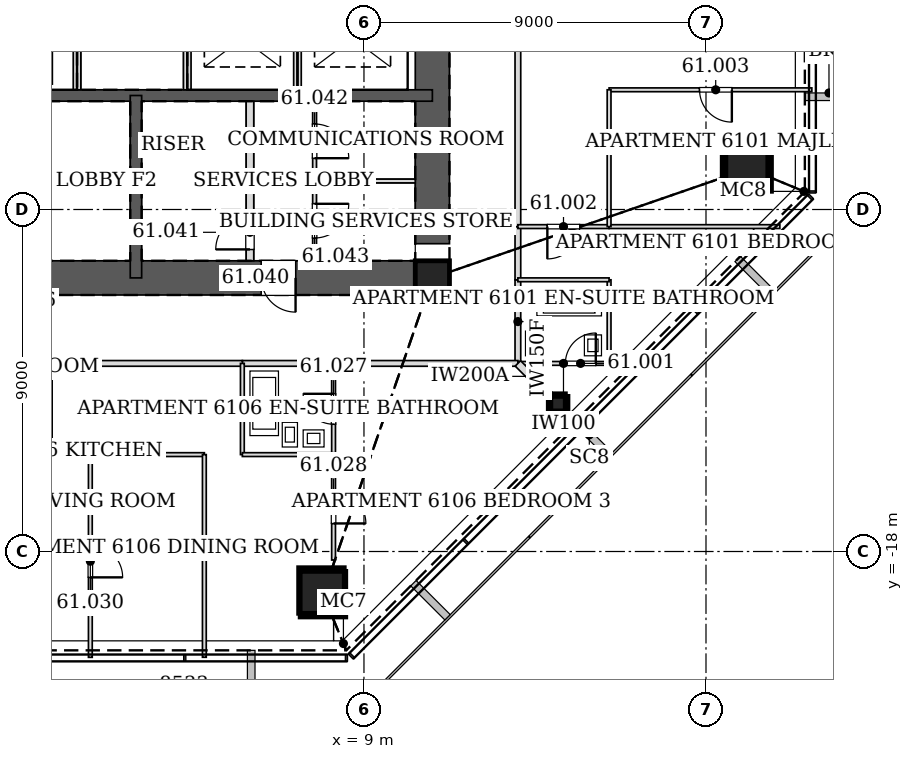
"""IFC4 building model, lengths in metres.
Left out: names, types, materials, properties, quantities, classifications, styles, units other than length and angle.
Written with IfcOpenShell. Run it as: python <this file> out.ifc"""

import sys

from ifc_helpers import new_model, si_unit, direction, frame, frame_2d, origin, origin_2d, place, context, subcontext, project, spatial, rectangle, hollow_rectangle, extrude, element, fill, save


model = new_model("IFC4")
c1 = context("Model", 3, precision=1e-05, world=origin(), true_north=direction((0.0, 1.0)))
c2 = subcontext(c1, "Body", "Model", "MODEL_VIEW")
j1 = project(units=[si_unit("LENGTHUNIT", "METRE"), si_unit("PLANEANGLEUNIT", "RADIAN")], contexts=[c1])
p1 = place(None, origin())
s1 = spatial("IfcSite", under=j1, at=p1, CompositionType="ELEMENT")
p2 = place(p1, origin())
s2 = spatial("IfcBuilding", under=s1, at=p2, CompositionType="ELEMENT")
p3 = place(p2, frame((0.0, 0.0, 255.0)))
s3 = spatial("IfcBuildingStorey", under=s2, at=p3, CompositionType="ELEMENT", Elevation=255.0)
for number, where, z_axis, x_axis in (
    (1, (7.921, -19.123, 0.0), (-0.012, 0.028, 1.0), (-0.924, -0.383, 0.0)),
    (2, (19.123, -7.921, 0.0), (-0.028, 0.012, 1.0), (-0.383, -0.924, 0.0)),
):
    element("IfcColumn", number, at=place(p3, frame(where, z_axis=z_axis, x_axis=x_axis)), inside=s3, PredefinedType="COLUMN", context=c2, shape_type="SweptSolid", body=[
        extrude(hollow_rectangle(XDim=1.2, YDim=1.2, WallThickness=0.055, at=origin_2d()), origin(), (0.0, 0.0, 1.0), 3.401),
    ])
p4 = place(p3, frame((14.143, -14.143, 0.0), z_axis=(-0.01995470925, 0.01995470925, 0.999601730269), x_axis=(-0.707106781187, -0.707106781187, 0.0)))
e3 = element("IfcColumn", 3, at=p4, inside=s3, PredefinedType="COLUMN", context=c2, shape_type="SweptSolid", body=[
    extrude(hollow_rectangle(XDim=0.45, YDim=0.45, WallThickness=0.02, at=origin_2d()), origin(), (0.0, 0.0, 1.0), 3.401),
])
p5 = place(p3, frame((10.8, -10.8, 0.0), z_axis=(0.0, 0.0, 1.0), x_axis=(1.0, 0.0, 0.0)))
e4 = element("IfcColumn", 4, at=p5, inside=s3, PredefinedType="COLUMN", context=c2, shape_type="SweptSolid", body=[
    extrude(hollow_rectangle(XDim=0.9, YDim=0.9, WallThickness=0.04, at=origin_2d()), origin(), (0.0, 0.0, 1.0), 3.4),
])
p6 = place(p3, frame((-10.8, -10.8, 0.0), z_axis=(0.0, 0.0, 1.0), x_axis=(1.0, 0.0, 0.0)))
e5 = element("IfcWall", 5, at=p6, inside=s3, PredefinedType="SOLIDWALL", context=c2, shape_type="SweptSolid", body=[
    extrude(rectangle(XDim=21.6, YDim=0.9, at=frame_2d((10.8, 0.0))), origin(), (0.0, 0.0, 1.0), 3.4),
])
p7 = place(p6, frame((10.05, 0.0, 0.0)))
e6 = element("IfcOpeningElement", 6, at=p7, cuts=e5, PredefinedType="OPENING", context=c2, shape_type="SweptSolid", body=[
    extrude(rectangle(XDim=1.5, YDim=2.1, at=frame_2d((0.75, 1.05))), frame((0.0, 0.46, 0.0), z_axis=(0.0, -1.0, 0.0), x_axis=(1.0, 0.0, 0.0)), (0.0, 0.0, 1.0), 0.92),
])
p8 = place(p6, frame((17.1, 0.0, 0.0)))
e7 = element("IfcOpeningElement", 7, at=p8, cuts=e5, PredefinedType="OPENING", context=c2, shape_type="SweptSolid", body=[
    extrude(rectangle(XDim=0.9, YDim=2.1, at=frame_2d((0.45, 1.05))), frame((0.0, 0.46, 0.0), z_axis=(0.0, -1.0, 0.0), x_axis=(1.0, 0.0, 0.0)), (0.0, 0.0, 1.0), 0.92),
])
p9 = place(p3, frame((10.8, -10.8, 0.0), z_axis=(0.0, 0.0, 1.0), x_axis=(0.0, 1.0, 0.0)))
e8 = element("IfcWall", 8, at=p9, inside=s3, PredefinedType="SOLIDWALL", context=c2, shape_type="SweptSolid", body=[
    extrude(rectangle(XDim=21.6, YDim=0.9, at=frame_2d((10.8, 0.0))), origin(), (0.0, 0.0, 1.0), 3.4),
])
p10 = place(p9, frame((11.7, 0.0, 0.0)))
e9 = element("IfcOpeningElement", 9, at=p10, cuts=e8, PredefinedType="OPENING", context=c2, shape_type="SweptSolid", body=[
    extrude(rectangle(XDim=1.2, YDim=2.1, at=frame_2d((0.6, 1.05))), frame((0.0, 0.46, 0.0), z_axis=(0.0, -1.0, 0.0), x_axis=(1.0, 0.0, 0.0)), (0.0, 0.0, 1.0), 0.92),
])
p11 = place(p9, frame((8.7, 0.0, 0.0)))
e10 = element("IfcOpeningElement", 10, at=p11, cuts=e8, PredefinedType="OPENING", context=c2, shape_type="SweptSolid", body=[
    extrude(rectangle(XDim=1.2, YDim=2.1, at=frame_2d((0.6, 1.05))), frame((0.0, 0.46, 0.0), z_axis=(0.0, -1.0, 0.0), x_axis=(1.0, 0.0, 0.0)), (0.0, 0.0, 1.0), 0.92),
])
p12 = place(p3, frame((-10.8, -6.0, 0.0), z_axis=(0.0, 0.0, 1.0), x_axis=(1.0, 0.0, 0.0)))
e11 = element("IfcWall", 11, at=p12, inside=s3, PredefinedType="SOLIDWALL", context=c2, shape_type="SweptSolid", body=[
    extrude(rectangle(XDim=21.6, YDim=0.3, at=frame_2d((10.8, 0.0))), origin(), (0.0, 0.0, 1.0), 3.4),
])
p13 = place(p12, frame((10.25, 0.0, 0.0)))
e12 = element("IfcOpeningElement", 12, at=p13, cuts=e11, PredefinedType="OPENING", context=c2, shape_type="SweptSolid", body=[
    extrude(rectangle(XDim=1.1, YDim=2.1, at=frame_2d((0.55, 1.05))), frame((0.0, 0.16, 0.0), z_axis=(0.0, -1.0, 0.0), x_axis=(1.0, 0.0, 0.0)), (0.0, 0.0, 1.0), 0.32),
])
p14 = place(p3, frame((3.0, -6.0, 0.0), z_axis=(0.0, 0.0, 1.0), x_axis=(0.0, -1.0, 0.0)))
e13 = element("IfcWall", 13, at=p14, inside=s3, PredefinedType="SOLIDWALL", context=c2, shape_type="SweptSolid", body=[
    extrude(rectangle(XDim=4.8, YDim=0.3, at=frame_2d((2.4, 0.0))), origin(), (0.0, 0.0, 1.0), 3.4),
])
p15 = place(p3, frame((13.05, -13.05, 0.0), z_axis=(0.0, 0.0, 1.0), x_axis=(0.0, 1.0, 0.0)))
e14 = element("IfcWall", 14, at=p15, inside=s3, PredefinedType="PARTITIONING", context=c2, shape_type="SweptSolid", body=[
    extrude(rectangle(XDim=2.201, YDim=0.15, at=frame_2d((1.101, 0.0))), origin(), (0.0, 0.0, 1.0), 2.656),
])
p16 = place(p3, frame((13.05, -10.851, 0.0), z_axis=(0.0, 0.0, 1.0), x_axis=(0.0, 1.0, 0.0)))
e15 = element("IfcWall", 15, at=p16, inside=s3, PredefinedType="PARTITIONING", context=c2, shape_type="SweptSolid", body=[
    extrude(rectangle(XDim=1.402, YDim=0.15, at=frame_2d((0.701, 0.0))), origin(), (0.0, 0.0, 1.0), 2.349),
])
p17 = place(p3, frame((13.05, -9.451, 0.0), z_axis=(0.0, 0.0, 1.0), x_axis=(0.0, 1.0, 0.0)))
e16 = element("IfcWall", 16, at=p17, inside=s3, PredefinedType="PARTITIONING", context=c2, shape_type="SweptSolid", body=[
    extrude(rectangle(XDim=5.402, YDim=0.15, at=frame_2d((2.701, 0.0))), origin(), (0.0, 0.0, 1.0), 2.662),
])
p18 = place(p3, frame((0.182, -13.05, 0.0), z_axis=(0.0, 0.0, 1.0), x_axis=(1.0, 0.0, 0.0)))
e17 = element("IfcWall", 17, at=p18, inside=s3, PredefinedType="PARTITIONING", context=c2, shape_type="SweptSolid", body=[
    extrude(rectangle(XDim=0.619, YDim=0.15, at=frame_2d((0.309, 0.0))), origin(), (0.0, 0.0, 1.0), 2.662),
])
p19 = place(p3, frame((5.799, -13.05, 0.0), z_axis=(0.0, 0.0, 1.0), x_axis=(1.0, 0.0, 0.0)))
e18 = element("IfcWall", 18, at=p19, inside=s3, PredefinedType="PARTITIONING", context=c2, shape_type="SweptSolid", body=[
    extrude(rectangle(XDim=2.402, YDim=0.15, at=frame_2d((1.201, 0.0))), origin(), (0.0, 0.0, 1.0), 2.662),
])
p20 = place(p3, frame((8.199, -13.05, 0.0), z_axis=(0.0, 0.0, 1.0), x_axis=(1.0, 0.0, 0.0)))
e19 = element("IfcWall", 19, at=p20, inside=s3, PredefinedType="PARTITIONING", context=c2, shape_type="SweptSolid", body=[
    extrude(rectangle(XDim=4.851, YDim=0.15, at=frame_2d((2.426, 0.0))), origin(), (0.0, 0.0, 1.0), 2.349),
])
p21 = place(p3, frame((0.799, -13.05, 0.0), z_axis=(0.0, 0.0, 1.0), x_axis=(1.0, 0.0, 0.0)))
e20 = element("IfcWall", 20, at=p21, inside=s3, PredefinedType="PARTITIONING", context=c2, shape_type="SweptSolid", body=[
    extrude(rectangle(XDim=5.002, YDim=0.15, at=frame_2d((2.501, 0.0))), origin(), (0.0, 0.0, 1.0), 2.662),
])
p22 = place(p3, frame((13.05, -13.05, 0.0), z_axis=(0.0, 0.0, 1.0), x_axis=(1.0, 0.0, 0.0)))
e21 = element("IfcWall", 21, at=p22, inside=s3, PredefinedType="PARTITIONING", context=c2, shape_type="SweptSolid", body=[
    extrude(rectangle(XDim=2.4, YDim=0.1, at=frame_2d((1.2, 0.0))), origin(), (0.0, 0.0, 1.0), 2.656),
])
p23 = place(p22, frame((1.25, 0.0, 0.0)))
e22 = element("IfcOpeningElement", 22, at=p23, cuts=e21, PredefinedType="OPENING", context=c2, shape_type="SweptSolid", body=[
    extrude(rectangle(XDim=0.8, YDim=2.1, at=frame_2d((0.4, 1.05))), frame((0.0, 0.06, 0.0), z_axis=(0.0, -1.0, 0.0), x_axis=(1.0, 0.0, 0.0)), (0.0, 0.0, 1.0), 0.12),
])
p24 = place(p3, frame((15.45, -13.05, 0.0), z_axis=(0.0, 0.0, 1.0), x_axis=(0.0, 1.0, 0.0)))
e23 = element("IfcWall", 23, at=p24, inside=s3, PredefinedType="PARTITIONING", context=c2, shape_type="SweptSolid", body=[
    extrude(rectangle(XDim=2.2, YDim=0.1, at=frame_2d((1.1, 0.0))), origin(), (0.0, 0.0, 1.0), 2.74),
])
p25 = place(p3, frame((15.45, -10.85, 0.0), z_axis=(0.0, 0.0, 1.0), x_axis=(-1.0, 0.0, 0.0)))
e24 = element("IfcWall", 24, at=p25, inside=s3, PredefinedType="PARTITIONING", context=c2, shape_type="SweptSolid", body=[
    extrude(rectangle(XDim=2.4, YDim=0.1, at=frame_2d((1.2, 0.0))), origin(), (0.0, 0.0, 1.0), 2.786),
])
p26 = place(p3, frame((19.943, -9.45, 0.0), z_axis=(0.0, 0.0, 1.0), x_axis=(-1.0, 0.0, 0.0)))
e25 = element("IfcWall", 25, at=p26, inside=s3, PredefinedType="PARTITIONING", context=c2, shape_type="SweptSolid", body=[
    extrude(rectangle(XDim=4.494, YDim=0.1, at=frame_2d((2.247, 0.0))), origin(), (0.0, 0.0, 1.0), 2.74),
])
p27 = place(p3, frame((15.451, -9.45, 0.0), z_axis=(0.0, 0.0, 1.0), x_axis=(-1.0, 0.0, 0.0)))
e26 = element("IfcWall", 26, at=p27, inside=s3, PredefinedType="PARTITIONING", context=c2, shape_type="SweptSolid", body=[
    extrude(rectangle(XDim=2.401, YDim=0.1, at=frame_2d((1.2, 0.0))), origin(), (0.0, 0.0, 1.0), 2.349),
])
p28 = place(p27, frame((0.775, 0.0, 0.0)))
e27 = element("IfcOpeningElement", 27, at=p28, cuts=e26, PredefinedType="OPENING", context=c2, shape_type="SweptSolid", body=[
    extrude(rectangle(XDim=0.85, YDim=2.1, at=frame_2d((0.425, 1.05))), frame((0.0, 0.06, 0.0), z_axis=(0.0, -1.0, 0.0), x_axis=(1.0, 0.0, 0.0)), (0.0, 0.0, 1.0), 0.12),
])
p29 = place(p3, frame((13.05, -13.05, 0.0), z_axis=(0.0, 0.0, 1.0), x_axis=(0.707106781187, -0.707106781187, 0.0)))
e28 = element("IfcWall", 28, at=p29, inside=s3, PredefinedType="PARTITIONING", context=c2, shape_type="SweptSolid", body=[
    extrude(rectangle(XDim=1.205, YDim=0.2, at=frame_2d((0.603, 0.0))), origin(), (0.0, 0.0, 1.0), 2.656),
])
p30 = place(p3, frame((20.785, -5.85, 0.0), z_axis=(0.0, 0.0, 1.0), x_axis=(-1.0, 0.0, 0.0)))
e29 = element("IfcWall", 29, at=p30, inside=s3, PredefinedType="PARTITIONING", context=c2, shape_type="SweptSolid", body=[
    extrude(rectangle(XDim=5.335, YDim=0.1, at=frame_2d((2.667, 0.0))), origin(), (0.0, 0.0, 1.0), 2.662),
])
p31 = place(p30, frame((2.104, 0.0, 0.0)))
e30 = element("IfcOpeningElement", 30, at=p31, cuts=e29, PredefinedType="OPENING", context=c2, shape_type="SweptSolid", body=[
    extrude(rectangle(XDim=0.85, YDim=2.1, at=frame_2d((0.425, 1.05))), frame((0.0, 0.06, 0.0), z_axis=(0.0, -1.0, 0.0), x_axis=(1.0, 0.0, 0.0)), (0.0, 0.0, 1.0), 0.12),
])
p32 = place(p3, frame((15.45, -5.85, 0.0), z_axis=(0.0, 0.0, 1.0), x_axis=(0.0, -1.0, 0.0)))
e31 = element("IfcWall", 31, at=p32, inside=s3, PredefinedType="PARTITIONING", context=c2, shape_type="SweptSolid", body=[
    extrude(rectangle(XDim=3.6, YDim=0.1, at=frame_2d((1.8, 0.0))), origin(), (0.0, 0.0, 1.0), 2.349),
])
p33 = place(p3, frame((8.2, -15.45, 0.0), z_axis=(0.0, 0.0, 1.0), x_axis=(0.0, 1.0, 0.0)))
e32 = element("IfcWall", 32, at=p33, inside=s3, PredefinedType="PARTITIONING", context=c2, shape_type="SweptSolid", body=[
    extrude(rectangle(XDim=2.4, YDim=0.1, at=frame_2d((1.2, 0.0))), origin(), (0.0, 0.0, 1.0), 2.662),
])
p34 = place(p33, frame((0.8, 0.0, 0.0)))
e33 = element("IfcOpeningElement", 33, at=p34, cuts=e32, PredefinedType="OPENING", context=c2, shape_type="SweptSolid", body=[
    extrude(rectangle(XDim=0.8, YDim=2.1, at=frame_2d((0.4, 1.05))), frame((0.0, 0.06, 0.0), z_axis=(0.0, -1.0, 0.0), x_axis=(1.0, 0.0, 0.0)), (0.0, 0.0, 1.0), 0.12),
])
p35 = place(p3, frame((5.8, -13.05, 0.0), z_axis=(0.0, 0.0, 1.0), x_axis=(0.0, -1.0, 0.0)))
e34 = element("IfcWall", 34, at=p35, inside=s3, PredefinedType="PARTITIONING", context=c2, shape_type="SweptSolid", body=[
    extrude(rectangle(XDim=2.4, YDim=0.1, at=frame_2d((1.2, 0.0))), origin(), (0.0, 0.0, 1.0), 2.662),
])
p36 = place(p3, frame((5.8, -15.45, 0.0), z_axis=(0.0, 0.0, 1.0), x_axis=(1.0, 0.0, 0.0)))
e35 = element("IfcWall", 35, at=p36, inside=s3, PredefinedType="PARTITIONING", context=c2, shape_type="SweptSolid", body=[
    extrude(rectangle(XDim=2.4, YDim=0.1, at=frame_2d((1.2, 0.0))), origin(), (0.0, 0.0, 1.0), 2.74),
])
p37 = place(p3, frame((8.2, -15.449, 0.0), z_axis=(0.0, 0.0, 1.0), x_axis=(0.0, -1.0, 0.0)))
e36 = element("IfcWall", 36, at=p37, inside=s3, PredefinedType="PARTITIONING", context=c2, shape_type="SweptSolid", body=[
    extrude(rectangle(XDim=2.775, YDim=0.1, at=frame_2d((1.388, 0.0))), origin(), (0.0, 0.0, 1.0), 2.349),
])
p38 = place(p37, frame((0.963, 0.0, 0.0)))
e37 = element("IfcOpeningElement", 37, at=p38, cuts=e36, PredefinedType="OPENING", context=c2, shape_type="SweptSolid", body=[
    extrude(rectangle(XDim=0.85, YDim=2.1, at=frame_2d((0.425, 1.05))), frame((0.0, 0.06, 0.0), z_axis=(0.0, -1.0, 0.0), x_axis=(1.0, 0.0, 0.0)), (0.0, 0.0, 1.0), 0.12),
])
p39 = place(p3, frame((8.2, -19.678, 0.0), z_axis=(0.0, 0.0, 1.0), x_axis=(0.0, -1.0, 0.0)))
e38 = element("IfcWall", 38, at=p39, inside=s3, PredefinedType="PARTITIONING", context=c2, shape_type="SweptSolid", body=[
    extrude(rectangle(XDim=1.105, YDim=0.1, at=frame_2d((0.553, 0.0))), origin(), (0.0, 0.0, 1.0), 3.2),
])
p40 = place(p3, frame((1.8, -20.785, 0.0), z_axis=(0.0, 0.0, 1.0), x_axis=(0.0, 1.0, 0.0)))
e39 = element("IfcWall", 39, at=p40, inside=s3, PredefinedType="PARTITIONING", context=c2, shape_type="SweptSolid", body=[
    extrude(rectangle(XDim=5.335, YDim=0.1, at=frame_2d((2.667, 0.0))), origin(), (0.0, 0.0, 1.0), 2.662),
])
p41 = place(p40, frame((2.104, 0.0, 0.0)))
e40 = element("IfcOpeningElement", 40, at=p41, cuts=e39, PredefinedType="OPENING", context=c2, shape_type="SweptSolid", body=[
    extrude(rectangle(XDim=0.85, YDim=2.1, at=frame_2d((0.425, 1.05))), frame((0.0, 0.06, 0.0), z_axis=(0.0, -1.0, 0.0), x_axis=(1.0, 0.0, 0.0)), (0.0, 0.0, 1.0), 0.12),
])
p42 = place(p3, frame((1.8, -15.45, 0.0), z_axis=(0.0, 0.0, 1.0), x_axis=(1.0, 0.0, 0.0)))
e41 = element("IfcWall", 41, at=p42, inside=s3, PredefinedType="PARTITIONING", context=c2, shape_type="SweptSolid", body=[
    extrude(rectangle(XDim=3.0, YDim=0.1, at=frame_2d((1.5, 0.0))), origin(), (0.0, 0.0, 1.0), 2.74),
])
p43 = place(p3, frame((4.8, -15.45, 0.0), z_axis=(0.0, 0.0, 1.0), x_axis=(0.0, -1.0, 0.0)))
e42 = element("IfcWall", 42, at=p43, inside=s3, PredefinedType="PARTITIONING", context=c2, shape_type="SweptSolid", body=[
    extrude(rectangle(XDim=5.333, YDim=0.1, at=frame_2d((2.667, 0.0))), origin(), (0.0, 0.0, 1.0), 2.662),
])
for number, where, z_axis, x_axis in (
    (43, (1.45, -5.85, 0.0), (0.0, 0.0, 1.0), (0.0, 1.0, 0.0)),
    (44, (4.35, -5.85, 0.0), (0.0, 0.0, 1.0), (0.0, 1.0, 0.0)),
):
    element("IfcWall", number, at=place(p3, frame(where, z_axis=z_axis, x_axis=x_axis)), inside=s3, PredefinedType="PARTITIONING", context=c2, shape_type="SweptSolid", body=[
        extrude(rectangle(XDim=2.7, YDim=0.2, at=frame_2d((1.35, 0.0))), origin(), (0.0, 0.0, 1.0), 3.2),
    ])
p44 = place(p3, frame((7.25, -5.85, 0.0), z_axis=(0.0, 0.0, 1.0), x_axis=(0.0, 1.0, 0.0)))
e45 = element("IfcWall", 45, at=p44, inside=s3, PredefinedType="PARTITIONING", context=c2, shape_type="SweptSolid", body=[
    extrude(rectangle(XDim=2.7, YDim=0.2, at=frame_2d((1.35, 0.0))), origin(), (0.0, 0.0, 1.0), 3.4),
])
p45 = place(p3, frame((6.0, -10.35, 0.0), z_axis=(0.0, 0.0, 1.0), x_axis=(0.0, 1.0, 0.0)))
e46 = element("IfcWall", 46, at=p45, inside=s3, PredefinedType="PARTITIONING", context=c2, shape_type="SweptSolid", body=[
    extrude(rectangle(XDim=4.2, YDim=0.2, at=frame_2d((2.1, 0.0))), origin(), (0.0, 0.0, 1.0), 3.2),
])
p46 = place(p45, frame((0.3, 0.0, 0.0)))
e47 = element("IfcOpeningElement", 47, at=p46, cuts=e46, PredefinedType="OPENING", context=c2, shape_type="SweptSolid", body=[
    extrude(rectangle(XDim=0.9, YDim=2.1, at=frame_2d((0.45, 1.05))), frame((0.0, 0.11, 0.0), z_axis=(0.0, -1.0, 0.0), x_axis=(1.0, 0.0, 0.0)), (0.0, 0.0, 1.0), 0.22),
])
p47 = place(p3, frame((7.7, -10.35, 0.0), z_axis=(0.0, 0.0, 1.0), x_axis=(0.0, 1.0, 0.0)))
e48 = element("IfcWall", 48, at=p47, inside=s3, PredefinedType="PARTITIONING", context=c2, shape_type="SweptSolid", body=[
    extrude(rectangle(XDim=4.2, YDim=0.1, at=frame_2d((2.1, 0.0))), origin(), (0.0, 0.0, 1.0), 3.2),
])
p48 = place(p47, frame((2.7, 0.0, 0.0)))
e49 = element("IfcOpeningElement", 49, at=p48, cuts=e48, PredefinedType="OPENING", context=c2, shape_type="SweptSolid", body=[
    extrude(rectangle(XDim=0.9, YDim=2.1, at=frame_2d((0.45, 1.05))), frame((0.0, 0.06, 0.0), z_axis=(0.0, -1.0, 0.0), x_axis=(1.0, 0.0, 0.0)), (0.0, 0.0, 1.0), 0.12),
])
p49 = place(p47, frame((0.6, 0.0, 0.0)))
e50 = element("IfcOpeningElement", 50, at=p49, cuts=e48, PredefinedType="OPENING", context=c2, shape_type="SweptSolid", body=[
    extrude(rectangle(XDim=0.9, YDim=2.1, at=frame_2d((0.45, 1.05))), frame((0.0, 0.06, 0.0), z_axis=(0.0, -1.0, 0.0), x_axis=(1.0, 0.0, 0.0)), (0.0, 0.0, 1.0), 0.12),
])
p50 = place(p3, frame((7.7, -8.25, 0.0), z_axis=(0.0, 0.0, 1.0), x_axis=(1.0, 0.0, 0.0)))
e51 = element("IfcWall", 51, at=p50, inside=s3, PredefinedType="PARTITIONING", context=c2, shape_type="SweptSolid", body=[
    extrude(rectangle(XDim=2.65, YDim=0.1, at=frame_2d((1.325, 0.0))), origin(), (0.0, 0.0, 1.0), 3.2),
])
p51 = place(p23, origin())
e52 = element("IfcDoor", 52, at=p51, inside=s3, OperationType="SINGLE_SWING_RIGHT", PredefinedType="DOOR", context=c2, shape_type="SweptSolid", body=[
    extrude(rectangle(XDim=0.8, YDim=2.1, at=frame_2d((0.4, 1.05))), frame((0.0, 0.025, 0.0), z_axis=(0.0, -1.0, 0.0), x_axis=(1.0, 0.0, 0.0)), (0.0, 0.0, 1.0), 0.05),
])
fill(e22, e52)
p52 = place(p28, origin())
e53 = element("IfcDoor", 53, at=p52, inside=s3, OperationType="SINGLE_SWING_RIGHT", PredefinedType="DOOR", context=c2, shape_type="SweptSolid", body=[
    extrude(rectangle(XDim=0.85, YDim=2.1, at=frame_2d((0.425, 1.05))), frame((0.0, 0.025, 0.0), z_axis=(0.0, -1.0, 0.0), x_axis=(1.0, 0.0, 0.0)), (0.0, 0.0, 1.0), 0.05),
])
fill(e27, e53)
p53 = place(p31, origin())
e54 = element("IfcDoor", 54, at=p53, inside=s3, OperationType="SINGLE_SWING_LEFT", PredefinedType="DOOR", context=c2, shape_type="SweptSolid", body=[
    extrude(rectangle(XDim=0.85, YDim=2.1, at=frame_2d((0.425, 1.05))), frame((0.0, 0.025, 0.0), z_axis=(0.0, -1.0, 0.0), x_axis=(1.0, 0.0, 0.0)), (0.0, 0.0, 1.0), 0.05),
])
fill(e30, e54)
p54 = place(p34, origin())
e55 = element("IfcDoor", 55, at=p54, inside=s3, OperationType="SINGLE_SWING_RIGHT", PredefinedType="DOOR", context=c2, shape_type="SweptSolid", body=[
    extrude(rectangle(XDim=0.8, YDim=2.1, at=frame_2d((0.4, 1.05))), frame((0.0, 0.025, 0.0), z_axis=(0.0, -1.0, 0.0), x_axis=(1.0, 0.0, 0.0)), (0.0, 0.0, 1.0), 0.05),
])
fill(e33, e55)
p55 = place(p38, origin())
e56 = element("IfcDoor", 56, at=p55, inside=s3, OperationType="SINGLE_SWING_RIGHT", PredefinedType="DOOR", context=c2, shape_type="SweptSolid", body=[
    extrude(rectangle(XDim=0.85, YDim=2.1, at=frame_2d((0.425, 1.05))), frame((0.0, 0.025, 0.0), z_axis=(0.0, -1.0, 0.0), x_axis=(1.0, 0.0, 0.0)), (0.0, 0.0, 1.0), 0.05),
])
fill(e37, e56)
p56 = place(p41, frame((0.85, 0.0, 0.0), z_axis=(0.0, 0.0, 1.0), x_axis=(-1.0, 0.0, 0.0)))
e57 = element("IfcDoor", 57, at=p56, inside=s3, OperationType="SINGLE_SWING_RIGHT", PredefinedType="DOOR", context=c2, shape_type="SweptSolid", body=[
    extrude(rectangle(XDim=0.85, YDim=2.1, at=frame_2d((0.425, 1.05))), frame((0.0, 0.025, 0.0), z_axis=(0.0, -1.0, 0.0), x_axis=(1.0, 0.0, 0.0)), (0.0, 0.0, 1.0), 0.05),
])
fill(e40, e57)
p57 = place(p8, frame((0.9, 0.0, 0.0), z_axis=(0.0, 0.0, 1.0), x_axis=(-1.0, 0.0, 0.0)))
e58 = element("IfcDoor", 58, at=p57, inside=s3, OperationType="SINGLE_SWING_LEFT", PredefinedType="DOOR", context=c2, shape_type="SweptSolid", body=[
    extrude(rectangle(XDim=0.9, YDim=2.1, at=frame_2d((0.45, 1.05))), frame((0.0, 0.025, 0.0), z_axis=(0.0, -1.0, 0.0), x_axis=(1.0, 0.0, 0.0)), (0.0, 0.0, 1.0), 0.05),
])
fill(e7, e58)
p58 = place(p46, origin())
e59 = element("IfcDoor", 59, at=p58, inside=s3, OperationType="SINGLE_SWING_LEFT", PredefinedType="DOOR", context=c2, shape_type="SweptSolid", body=[
    extrude(rectangle(XDim=0.9, YDim=2.1, at=frame_2d((0.45, 1.05))), frame((0.0, 0.025, 0.0), z_axis=(0.0, -1.0, 0.0), x_axis=(1.0, 0.0, 0.0)), (0.0, 0.0, 1.0), 0.05),
])
fill(e47, e59)
p59 = place(p48, frame((0.9, 0.0, 0.0), z_axis=(0.0, 0.0, 1.0), x_axis=(-1.0, 0.0, 0.0)))
e60 = element("IfcDoor", 60, at=p59, inside=s3, OperationType="SINGLE_SWING_RIGHT", PredefinedType="DOOR", context=c2, shape_type="SweptSolid", body=[
    extrude(rectangle(XDim=0.9, YDim=2.1, at=frame_2d((0.45, 1.05))), frame((0.0, 0.025, 0.0), z_axis=(0.0, -1.0, 0.0), x_axis=(1.0, 0.0, 0.0)), (0.0, 0.0, 1.0), 0.05),
])
fill(e49, e60)
p60 = place(p49, frame((0.9, 0.0, 0.0), z_axis=(0.0, 0.0, 1.0), x_axis=(-1.0, 0.0, 0.0)))
e61 = element("IfcDoor", 61, at=p60, inside=s3, OperationType="SINGLE_SWING_LEFT", PredefinedType="DOOR", context=c2, shape_type="SweptSolid", body=[
    extrude(rectangle(XDim=0.9, YDim=2.1, at=frame_2d((0.45, 1.05))), frame((0.0, 0.025, 0.0), z_axis=(0.0, -1.0, 0.0), x_axis=(1.0, 0.0, 0.0)), (0.0, 0.0, 1.0), 0.05),
])
fill(e50, e61)
save(model, sys.argv[1])
